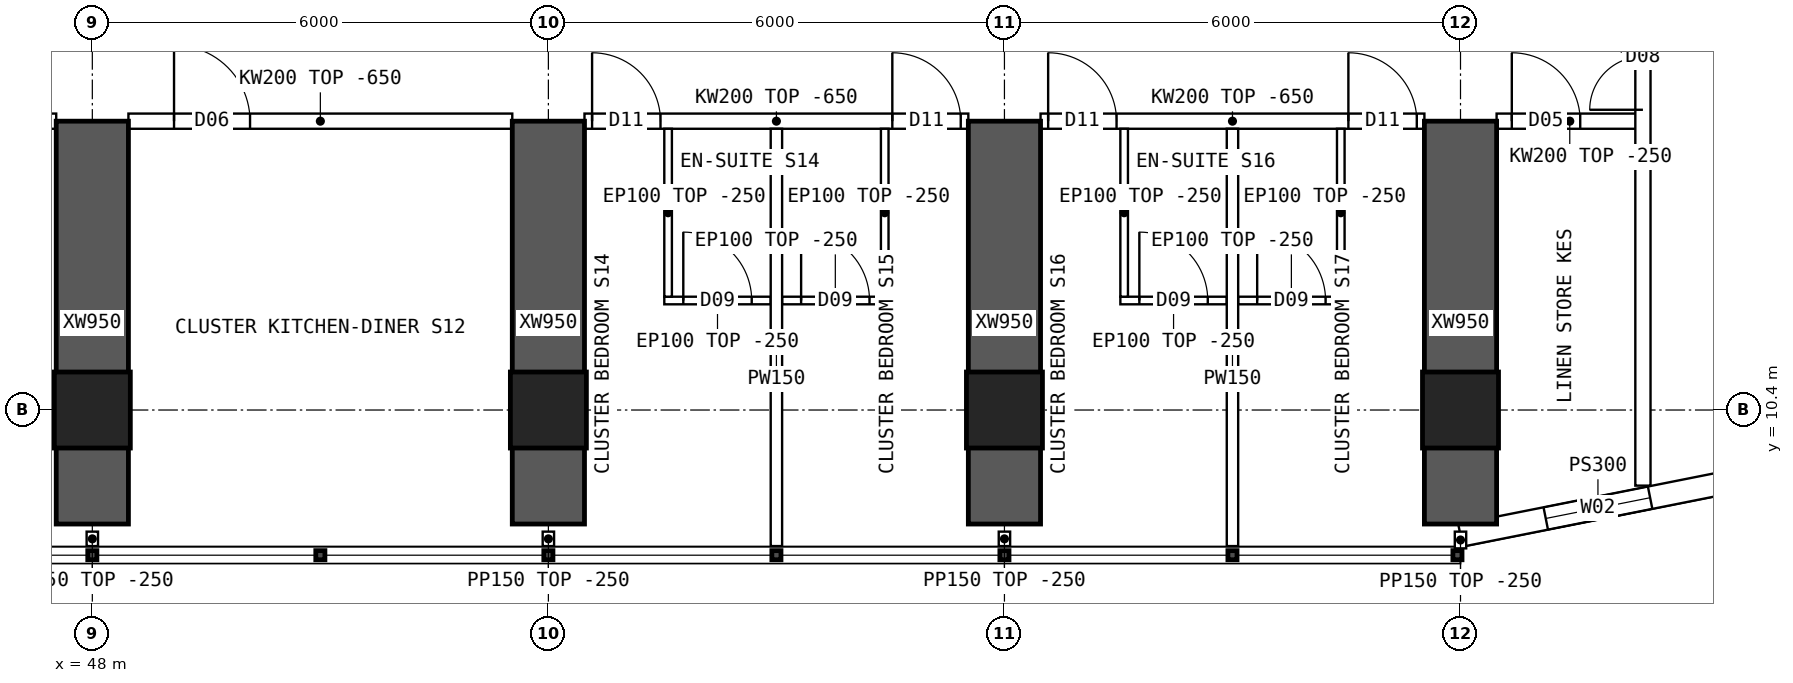
"""IFC4 building model, lengths in metres.
Left out: names, types, materials, properties, quantities, classifications, styles, units other than length and angle.
Written with IfcOpenShell. Run it as: python <this file> out.ifc"""

import sys

from ifc_helpers import new_model, si_unit, direction, frame, frame_2d, origin, origin_2d, place, context, subcontext, project, spatial, polyline, rectangle, hollow_rectangle, outline, extrude, element, fill, save


model = new_model("IFC4")
c1 = context("Model", 3, precision=1e-05, world=origin(), true_north=direction((0.0, 1.0)))
c2 = subcontext(c1, "Body", "Model", "MODEL_VIEW")
j1 = project(units=[si_unit("LENGTHUNIT", "METRE"), si_unit("PLANEANGLEUNIT", "RADIAN")], contexts=[c1])
p1 = place(None, origin())
s1 = spatial("IfcSite", under=j1, at=p1, CompositionType="ELEMENT")
p2 = place(p1, origin())
s2 = spatial("IfcBuilding", under=s1, at=p2, CompositionType="ELEMENT")
p3 = place(p2, frame((0.0, 0.0, 91.9)))
s3 = spatial("IfcBuildingStorey", under=s2, at=p3, CompositionType="ELEMENT", Elevation=91.9)
for number, where, z_axis, x_axis in (
    (1, (48.0, 10.4, 0.0), (0.0, 0.0, 1.0), (1.0, 0.0, 0.0)),
    (2, (54.0, 10.4, 0.0), (0.0, 0.0, 1.0), (1.0, 0.0, 0.0)),
    (3, (60.0, 10.4, 0.0), (0.0, 0.0, 1.0), (1.0, 0.0, 0.0)),
    (4, (66.0, 10.4, 0.0), (0.0, 0.0, 1.0), (1.0, 0.0, 0.0)),
):
    element("IfcColumn", number, at=place(p3, frame(where, z_axis=z_axis, x_axis=x_axis)), inside=s3, PredefinedType="COLUMN", context=c2, shape_type="SweptSolid", body=[
        extrude(hollow_rectangle(XDim=1.0, YDim=1.0, WallThickness=0.1, at=origin_2d()), origin(), (0.0, 0.0, 1.0), 3.75),
    ])
for number, where, z_axis, x_axis in (
    (5, (48.0, 8.9, 0.0), (0.0, 0.0, 1.0), (0.0, 1.0, 0.0)),
    (6, (54.0, 8.9, 0.0), (0.0, 0.0, 1.0), (0.0, 1.0, 0.0)),
    (7, (60.0, 8.9, 0.0), (0.0, 0.0, 1.0), (0.0, 1.0, 0.0)),
    (8, (66.0, 8.9, 0.0), (0.0, 0.0, 1.0), (0.0, 1.0, 0.0)),
):
    element("IfcWall", number, at=place(p3, frame(where, z_axis=z_axis, x_axis=x_axis)), inside=s3, PredefinedType="SHEAR", context=c2, shape_type="SweptSolid", body=[
        extrude(rectangle(XDim=5.3, YDim=0.95, at=frame_2d((2.65, 0.0))), origin(), (0.0, 0.0, 1.0), 3.75),
    ])
p4 = place(p3, frame((66.0, 8.75, 0.0), z_axis=(0.0, 0.0, 1.0), x_axis=(0.980791473772, 0.195059183267, 0.0)))
e9 = element("IfcWall", 9, at=p4, inside=s3, PredefinedType="SOLIDWALL", context=c2, shape_type="SweptSolid", body=[
    extrude(outline(polyline([(-0.03, -0.15), (3.717, -0.15), (3.657, 0.15), (0.03, 0.15), (-0.03, -0.15)])), origin(), (0.0, 0.0, 1.0), 3.5),
])
p5 = place(p4, frame((1.144, 0.0, 0.9)))
e10 = element("IfcOpeningElement", 10, at=p5, cuts=e9, PredefinedType="OPENING", context=c2, shape_type="SweptSolid", body=[
    extrude(rectangle(XDim=1.4, YDim=1.8, at=frame_2d((0.7, 0.9))), frame((0.0, 0.16, 0.0), z_axis=(0.0, -1.0, 0.0), x_axis=(1.0, 0.0, 0.0)), (0.0, 0.0, 1.0), 0.32),
])
p6 = place(p3, frame((42.475, 14.2, 0.0), z_axis=(0.0, 0.0, 1.0), x_axis=(1.0, 0.0, 0.0)))
e11 = element("IfcWall", 11, at=p6, inside=s3, PredefinedType="SOLIDWALL", context=c2, shape_type="SweptSolid", body=[
    extrude(outline(polyline([(0.0, 0.0), (5.05, 0.0), (5.05, 3.1), (0.0, 3.1), (0.0, 0.0)])), frame((0.0, 0.1, 0.0), z_axis=(0.0, -1.0, 0.0), x_axis=(1.0, 0.0, 0.0)), (0.0, 0.0, 1.0), 0.2),
])
p7 = place(p6, frame((0.1, 0.0, 0.0)))
e12 = element("IfcOpeningElement", 12, at=p7, cuts=e11, PredefinedType="OPENING", context=c2, shape_type="SweptSolid", body=[
    extrude(rectangle(XDim=0.9, YDim=2.1, at=frame_2d((0.45, 1.05))), frame((0.0, 0.11, 0.0), z_axis=(0.0, -1.0, 0.0), x_axis=(1.0, 0.0, 0.0)), (0.0, 0.0, 1.0), 0.22),
])
p8 = place(p6, frame((4.05, 0.0, 0.0)))
e13 = element("IfcOpeningElement", 13, at=p8, cuts=e11, PredefinedType="OPENING", context=c2, shape_type="SweptSolid", body=[
    extrude(rectangle(XDim=0.9, YDim=2.1, at=frame_2d((0.45, 1.05))), frame((0.0, 0.11, 0.0), z_axis=(0.0, -1.0, 0.0), x_axis=(1.0, 0.0, 0.0)), (0.0, 0.0, 1.0), 0.22),
])
p9 = place(p3, frame((48.475, 14.2, 0.0), z_axis=(0.0, 0.0, 1.0), x_axis=(1.0, 0.0, 0.0)))
e14 = element("IfcWall", 14, at=p9, inside=s3, PredefinedType="SOLIDWALL", context=c2, shape_type="SweptSolid", body=[
    extrude(outline(polyline([(0.0, 0.0), (5.05, 0.0), (5.05, 3.1), (0.0, 3.1), (0.0, 0.0)])), frame((0.0, 0.1, 0.0), z_axis=(0.0, -1.0, 0.0), x_axis=(1.0, 0.0, 0.0)), (0.0, 0.0, 1.0), 0.2),
])
p10 = place(p9, frame((0.6, 0.0, 0.0)))
e15 = element("IfcOpeningElement", 15, at=p10, cuts=e14, PredefinedType="OPENING", context=c2, shape_type="SweptSolid", body=[
    extrude(rectangle(XDim=1.0, YDim=2.1, at=frame_2d((0.5, 1.05))), frame((0.0, 0.11, 0.0), z_axis=(0.0, -1.0, 0.0), x_axis=(1.0, 0.0, 0.0)), (0.0, 0.0, 1.0), 0.22),
])
p11 = place(p3, frame((54.475, 14.2, 0.0), z_axis=(0.0, 0.0, 1.0), x_axis=(1.0, 0.0, 0.0)))
e16 = element("IfcWall", 16, at=p11, inside=s3, PredefinedType="SOLIDWALL", context=c2, shape_type="SweptSolid", body=[
    extrude(outline(polyline([(0.0, 0.0), (5.05, 0.0), (5.05, 3.1), (0.0, 3.1), (0.0, 0.0)])), frame((0.0, 0.1, 0.0), z_axis=(0.0, -1.0, 0.0), x_axis=(1.0, 0.0, 0.0)), (0.0, 0.0, 1.0), 0.2),
])
p12 = place(p11, frame((0.1, 0.0, 0.0)))
e17 = element("IfcOpeningElement", 17, at=p12, cuts=e16, PredefinedType="OPENING", context=c2, shape_type="SweptSolid", body=[
    extrude(rectangle(XDim=0.9, YDim=2.1, at=frame_2d((0.45, 1.05))), frame((0.0, 0.11, 0.0), z_axis=(0.0, -1.0, 0.0), x_axis=(1.0, 0.0, 0.0)), (0.0, 0.0, 1.0), 0.22),
])
p13 = place(p11, frame((4.05, 0.0, 0.0)))
e18 = element("IfcOpeningElement", 18, at=p13, cuts=e16, PredefinedType="OPENING", context=c2, shape_type="SweptSolid", body=[
    extrude(rectangle(XDim=0.9, YDim=2.1, at=frame_2d((0.45, 1.05))), frame((0.0, 0.11, 0.0), z_axis=(0.0, -1.0, 0.0), x_axis=(1.0, 0.0, 0.0)), (0.0, 0.0, 1.0), 0.22),
])
p14 = place(p3, frame((60.475, 14.2, 0.0), z_axis=(0.0, 0.0, 1.0), x_axis=(1.0, 0.0, 0.0)))
e19 = element("IfcWall", 19, at=p14, inside=s3, PredefinedType="SOLIDWALL", context=c2, shape_type="SweptSolid", body=[
    extrude(outline(polyline([(0.0, 0.0), (5.05, 0.0), (5.05, 3.1), (0.0, 3.1), (0.0, 0.0)])), frame((0.0, 0.1, 0.0), z_axis=(0.0, -1.0, 0.0), x_axis=(1.0, 0.0, 0.0)), (0.0, 0.0, 1.0), 0.2),
])
p15 = place(p14, frame((0.1, 0.0, 0.0)))
e20 = element("IfcOpeningElement", 20, at=p15, cuts=e19, PredefinedType="OPENING", context=c2, shape_type="SweptSolid", body=[
    extrude(rectangle(XDim=0.9, YDim=2.1, at=frame_2d((0.45, 1.05))), frame((0.0, 0.11, 0.0), z_axis=(0.0, -1.0, 0.0), x_axis=(1.0, 0.0, 0.0)), (0.0, 0.0, 1.0), 0.22),
])
p16 = place(p14, frame((4.05, 0.0, 0.0)))
e21 = element("IfcOpeningElement", 21, at=p16, cuts=e19, PredefinedType="OPENING", context=c2, shape_type="SweptSolid", body=[
    extrude(rectangle(XDim=0.9, YDim=2.1, at=frame_2d((0.45, 1.05))), frame((0.0, 0.11, 0.0), z_axis=(0.0, -1.0, 0.0), x_axis=(1.0, 0.0, 0.0)), (0.0, 0.0, 1.0), 0.22),
])
p17 = place(p3, frame((66.475, 14.2, 0.0), z_axis=(0.0, 0.0, 1.0), x_axis=(1.0, 0.0, 0.0)))
e22 = element("IfcWall", 22, at=p17, inside=s3, PredefinedType="SOLIDWALL", context=c2, shape_type="SweptSolid", body=[
    extrude(rectangle(XDim=1.925, YDim=0.2, at=frame_2d((0.962, 0.0))), origin(), (0.0, 0.0, 1.0), 3.5),
])
p18 = place(p17, frame((0.2, 0.0, 0.0)))
e23 = element("IfcOpeningElement", 23, at=p18, cuts=e22, PredefinedType="OPENING", context=c2, shape_type="SweptSolid", body=[
    extrude(rectangle(XDim=0.9, YDim=2.1, at=frame_2d((0.45, 1.05))), frame((0.0, 0.11, 0.0), z_axis=(0.0, -1.0, 0.0), x_axis=(1.0, 0.0, 0.0)), (0.0, 0.0, 1.0), 0.22),
])
p19 = place(p3, frame((57.0, 8.61, 0.0), z_axis=(0.0, 0.0, 1.0), x_axis=(0.0, 1.0, 0.0)))
e24 = element("IfcWall", 24, at=p19, inside=s3, PredefinedType="PARTITIONING", context=c2, shape_type="SweptSolid", body=[
    extrude(outline(polyline([(0.0, 0.0), (5.49, 0.0), (5.49, 3.1), (5.442, 3.1), (5.44, 3.5), (1.992, 3.5), (1.99, 3.1), (1.592, 3.1), (1.59, 3.5), (0.0, 3.5), (0.0, 0.0)])), frame((0.0, 0.075, 0.0), z_axis=(0.0, -1.0, 0.0), x_axis=(1.0, 0.0, 0.0)), (0.0, 0.0, 1.0), 0.15),
])
p20 = place(p3, frame((56.925, 11.841, 0.0), z_axis=(0.0, 0.0, 1.0), x_axis=(-1.0, 0.0, 0.0)))
e25 = element("IfcWall", 25, at=p20, inside=s3, PredefinedType="PARTITIONING", context=c2, shape_type="SweptSolid", body=[
    extrude(rectangle(XDim=1.4, YDim=0.1, at=frame_2d((0.7, 0.0))), origin(), (0.0, 0.0, 1.0), 3.5),
])
p21 = place(p20, frame((0.25, 0.0, 0.0)))
e26 = element("IfcOpeningElement", 26, at=p21, cuts=e25, PredefinedType="OPENING", context=c2, shape_type="SweptSolid", body=[
    extrude(rectangle(XDim=0.9, YDim=2.1, at=frame_2d((0.45, 1.05))), frame((0.0, 0.06, 0.0), z_axis=(0.0, -1.0, 0.0), x_axis=(1.0, 0.0, 0.0)), (0.0, 0.0, 1.0), 0.12),
])
p22 = place(p3, frame((55.575, 11.891, 0.0), z_axis=(0.0, 0.0, 1.0), x_axis=(0.0, 1.0, 0.0)))
e27 = element("IfcWall", 27, at=p22, inside=s3, PredefinedType="PARTITIONING", context=c2, shape_type="SweptSolid", body=[
    extrude(outline(polyline([(0.0, 0.0), (2.209, 0.0), (2.209, 3.1), (2.161, 3.1), (2.159, 3.5), (0.0, 3.5), (0.0, 0.0)])), frame((0.0, 0.05, 0.0), z_axis=(0.0, -1.0, 0.0), x_axis=(1.0, 0.0, 0.0)), (0.0, 0.0, 1.0), 0.1),
])
p23 = place(p3, frame((58.475, 11.841, 0.0), z_axis=(0.0, 0.0, 1.0), x_axis=(-1.0, 0.0, 0.0)))
e28 = element("IfcWall", 28, at=p23, inside=s3, PredefinedType="PARTITIONING", context=c2, shape_type="SweptSolid", body=[
    extrude(rectangle(XDim=1.4, YDim=0.1, at=frame_2d((0.7, 0.0))), origin(), (0.0, 0.0, 1.0), 3.5),
])
p24 = place(p23, frame((0.25, 0.0, 0.0)))
e29 = element("IfcOpeningElement", 29, at=p24, cuts=e28, PredefinedType="OPENING", context=c2, shape_type="SweptSolid", body=[
    extrude(rectangle(XDim=0.9, YDim=2.1, at=frame_2d((0.45, 1.05))), frame((0.0, 0.06, 0.0), z_axis=(0.0, -1.0, 0.0), x_axis=(1.0, 0.0, 0.0)), (0.0, 0.0, 1.0), 0.12),
])
p25 = place(p3, frame((58.425, 11.891, 0.0), z_axis=(0.0, 0.0, 1.0), x_axis=(0.0, 1.0, 0.0)))
e30 = element("IfcWall", 30, at=p25, inside=s3, PredefinedType="PARTITIONING", context=c2, shape_type="SweptSolid", body=[
    extrude(outline(polyline([(0.0, 0.0), (2.209, 0.0), (2.209, 3.1), (2.161, 3.1), (2.159, 3.5), (0.0, 3.5), (0.0, 0.0)])), frame((0.0, 0.05, 0.0), z_axis=(0.0, -1.0, 0.0), x_axis=(1.0, 0.0, 0.0)), (0.0, 0.0, 1.0), 0.1),
])
p26 = place(p3, frame((63.0, 8.61, 0.0), z_axis=(0.0, 0.0, 1.0), x_axis=(0.0, 1.0, 0.0)))
e31 = element("IfcWall", 31, at=p26, inside=s3, PredefinedType="PARTITIONING", context=c2, shape_type="SweptSolid", body=[
    extrude(outline(polyline([(0.0, 0.0), (5.49, 0.0), (5.49, 3.1), (5.442, 3.1), (5.44, 3.5), (1.992, 3.5), (1.99, 3.1), (1.592, 3.1), (1.59, 3.5), (0.0, 3.5), (0.0, 0.0)])), frame((0.0, 0.075, 0.0), z_axis=(0.0, -1.0, 0.0), x_axis=(1.0, 0.0, 0.0)), (0.0, 0.0, 1.0), 0.15),
])
p27 = place(p3, frame((62.925, 11.841, 0.0), z_axis=(0.0, 0.0, 1.0), x_axis=(-1.0, 0.0, 0.0)))
e32 = element("IfcWall", 32, at=p27, inside=s3, PredefinedType="PARTITIONING", context=c2, shape_type="SweptSolid", body=[
    extrude(rectangle(XDim=1.4, YDim=0.1, at=frame_2d((0.7, 0.0))), origin(), (0.0, 0.0, 1.0), 3.5),
])
p28 = place(p27, frame((0.25, 0.0, 0.0)))
e33 = element("IfcOpeningElement", 33, at=p28, cuts=e32, PredefinedType="OPENING", context=c2, shape_type="SweptSolid", body=[
    extrude(rectangle(XDim=0.9, YDim=2.1, at=frame_2d((0.45, 1.05))), frame((0.0, 0.06, 0.0), z_axis=(0.0, -1.0, 0.0), x_axis=(1.0, 0.0, 0.0)), (0.0, 0.0, 1.0), 0.12),
])
p29 = place(p3, frame((61.575, 11.891, 0.0), z_axis=(0.0, 0.0, 1.0), x_axis=(0.0, 1.0, 0.0)))
e34 = element("IfcWall", 34, at=p29, inside=s3, PredefinedType="PARTITIONING", context=c2, shape_type="SweptSolid", body=[
    extrude(outline(polyline([(0.0, 0.0), (2.209, 0.0), (2.209, 3.1), (2.161, 3.1), (2.159, 3.5), (0.0, 3.5), (0.0, 0.0)])), frame((0.0, 0.05, 0.0), z_axis=(0.0, -1.0, 0.0), x_axis=(1.0, 0.0, 0.0)), (0.0, 0.0, 1.0), 0.1),
])
p30 = place(p3, frame((64.475, 11.841, 0.0), z_axis=(0.0, 0.0, 1.0), x_axis=(-1.0, 0.0, 0.0)))
e35 = element("IfcWall", 35, at=p30, inside=s3, PredefinedType="PARTITIONING", context=c2, shape_type="SweptSolid", body=[
    extrude(rectangle(XDim=1.4, YDim=0.1, at=frame_2d((0.7, 0.0))), origin(), (0.0, 0.0, 1.0), 3.5),
])
p31 = place(p30, frame((0.25, 0.0, 0.0)))
e36 = element("IfcOpeningElement", 36, at=p31, cuts=e35, PredefinedType="OPENING", context=c2, shape_type="SweptSolid", body=[
    extrude(rectangle(XDim=0.9, YDim=2.1, at=frame_2d((0.45, 1.05))), frame((0.0, 0.06, 0.0), z_axis=(0.0, -1.0, 0.0), x_axis=(1.0, 0.0, 0.0)), (0.0, 0.0, 1.0), 0.12),
])
p32 = place(p3, frame((64.425, 11.891, 0.0), z_axis=(0.0, 0.0, 1.0), x_axis=(0.0, 1.0, 0.0)))
e37 = element("IfcWall", 37, at=p32, inside=s3, PredefinedType="PARTITIONING", context=c2, shape_type="SweptSolid", body=[
    extrude(outline(polyline([(0.0, 0.0), (2.209, 0.0), (2.209, 3.1), (2.161, 3.1), (2.159, 3.5), (0.0, 3.5), (0.0, 0.0)])), frame((0.0, 0.05, 0.0), z_axis=(0.0, -1.0, 0.0), x_axis=(1.0, 0.0, 0.0)), (0.0, 0.0, 1.0), 0.1),
])
p33 = place(p3, frame((68.4, 9.405, 0.0), z_axis=(0.0, 0.0, 1.0), x_axis=(0.0, 1.0, 0.0)))
e38 = element("IfcWall", 38, at=p33, inside=s3, PredefinedType="SOLIDWALL", context=c2, shape_type="SweptSolid", body=[
    extrude(rectangle(XDim=45.189, YDim=0.2, at=frame_2d((22.595, 0.0))), origin(), (0.0, 0.0, 1.0), 3.5),
])
p34 = place(p33, frame((18.395, 0.0, 0.0)))
e39 = element("IfcOpeningElement", 39, at=p34, cuts=e38, PredefinedType="OPENING", context=c2, shape_type="SweptSolid", body=[
    extrude(rectangle(XDim=1.2, YDim=2.1, at=frame_2d((0.6, 1.05))), frame((0.0, 0.11, 0.0), z_axis=(0.0, -1.0, 0.0), x_axis=(1.0, 0.0, 0.0)), (0.0, 0.0, 1.0), 0.22),
])
p35 = place(p33, frame((30.195, 0.0, 0.0)))
e40 = element("IfcOpeningElement", 40, at=p35, cuts=e38, PredefinedType="OPENING", context=c2, shape_type="SweptSolid", body=[
    extrude(rectangle(XDim=1.2, YDim=2.1, at=frame_2d((0.6, 1.05))), frame((0.0, 0.11, 0.0), z_axis=(0.0, -1.0, 0.0), x_axis=(1.0, 0.0, 0.0)), (0.0, 0.0, 1.0), 0.22),
])
p36 = place(p33, frame((4.945, 0.0, 0.0)))
e41 = element("IfcOpeningElement", 41, at=p36, cuts=e38, PredefinedType="OPENING", context=c2, shape_type="SweptSolid", body=[
    extrude(rectangle(XDim=1.4, YDim=2.1, at=frame_2d((0.7, 1.05))), frame((0.0, 0.11, 0.0), z_axis=(0.0, -1.0, 0.0), x_axis=(1.0, 0.0, 0.0)), (0.0, 0.0, 1.0), 0.22),
])
p37 = place(p33, frame((38.745, 0.0, 0.0)))
e42 = element("IfcOpeningElement", 42, at=p37, cuts=e38, PredefinedType="OPENING", context=c2, shape_type="SweptSolid", body=[
    extrude(rectangle(XDim=1.4, YDim=2.1, at=frame_2d((0.7, 1.05))), frame((0.0, 0.11, 0.0), z_axis=(0.0, -1.0, 0.0), x_axis=(1.0, 0.0, 0.0)), (0.0, 0.0, 1.0), 0.22),
])
for number, where, z_axis, x_axis in (
    (43, (48.0, 8.8, 0.0), (0.0, 0.0, 1.0), (0.0, -1.0, 0.0)),
    (44, (54.0, 8.8, 0.0), (0.0, 0.0, 1.0), (0.0, -1.0, 0.0)),
    (45, (60.0, 8.8, 0.0), (0.0, 0.0, 1.0), (0.0, -1.0, 0.0)),
):
    element("IfcWall", number, at=place(p3, frame(where, z_axis=z_axis, x_axis=x_axis)), inside=s3, PredefinedType="PARTITIONING", context=c2, shape_type="SweptSolid", body=[
        extrude(rectangle(XDim=0.19, YDim=0.15, at=frame_2d((0.095, 0.0))), origin(), (0.0, 0.0, 1.0), 3.5),
    ])
p38 = place(p3, frame((66.0, 8.8, 0.0), z_axis=(0.0, 0.0, 1.0), x_axis=(0.0, -1.0, 0.0)))
e46 = element("IfcWall", 46, at=p38, inside=s3, PredefinedType="PARTITIONING", context=c2, shape_type="SweptSolid", body=[
    extrude(rectangle(XDim=0.22, YDim=0.15, at=frame_2d((0.11, 0.0))), origin(), (0.0, 0.0, 1.0), 3.5),
])
p39 = place(p5, origin())
e47 = element("IfcWindow", 47, at=p39, inside=s3, PartitioningType="SINGLE_PANEL", PredefinedType="WINDOW", context=c2, shape_type="SweptSolid", body=[
    extrude(rectangle(XDim=1.4, YDim=1.8, at=frame_2d((0.7, 0.9))), frame((0.0, 0.03, 0.0), z_axis=(0.0, -1.0, 0.0), x_axis=(1.0, 0.0, 0.0)), (0.0, 0.0, 1.0), 0.06),
])
fill(e10, e47)
p40 = place(p10, origin())
e48 = element("IfcDoor", 48, at=p40, inside=s3, OperationType="SINGLE_SWING_LEFT", PredefinedType="DOOR", context=c2, shape_type="SweptSolid", body=[
    extrude(rectangle(XDim=1.0, YDim=2.1, at=frame_2d((0.5, 1.05))), frame((0.0, 0.025, 0.0), z_axis=(0.0, -1.0, 0.0), x_axis=(1.0, 0.0, 0.0)), (0.0, 0.0, 1.0), 0.05),
])
fill(e15, e48)
p41 = place(p21, origin())
e49 = element("IfcDoor", 49, at=p41, inside=s3, OperationType="SINGLE_SWING_RIGHT", PredefinedType="DOOR", context=c2, shape_type="SweptSolid", body=[
    extrude(rectangle(XDim=0.9, YDim=2.1, at=frame_2d((0.45, 1.05))), frame((0.0, 0.025, 0.0), z_axis=(0.0, -1.0, 0.0), x_axis=(1.0, 0.0, 0.0)), (0.0, 0.0, 1.0), 0.05),
])
fill(e26, e49)
p42 = place(p12, origin())
e50 = element("IfcDoor", 50, at=p42, inside=s3, OperationType="SINGLE_SWING_LEFT", PredefinedType="DOOR", context=c2, shape_type="SweptSolid", body=[
    extrude(rectangle(XDim=0.9, YDim=2.1, at=frame_2d((0.45, 1.05))), frame((0.0, 0.025, 0.0), z_axis=(0.0, -1.0, 0.0), x_axis=(1.0, 0.0, 0.0)), (0.0, 0.0, 1.0), 0.05),
])
fill(e17, e50)
p43 = place(p24, origin())
e51 = element("IfcDoor", 51, at=p43, inside=s3, OperationType="SINGLE_SWING_RIGHT", PredefinedType="DOOR", context=c2, shape_type="SweptSolid", body=[
    extrude(rectangle(XDim=0.9, YDim=2.1, at=frame_2d((0.45, 1.05))), frame((0.0, 0.025, 0.0), z_axis=(0.0, -1.0, 0.0), x_axis=(1.0, 0.0, 0.0)), (0.0, 0.0, 1.0), 0.05),
])
fill(e29, e51)
p44 = place(p13, origin())
e52 = element("IfcDoor", 52, at=p44, inside=s3, OperationType="SINGLE_SWING_LEFT", PredefinedType="DOOR", context=c2, shape_type="SweptSolid", body=[
    extrude(rectangle(XDim=0.9, YDim=2.1, at=frame_2d((0.45, 1.05))), frame((0.0, 0.025, 0.0), z_axis=(0.0, -1.0, 0.0), x_axis=(1.0, 0.0, 0.0)), (0.0, 0.0, 1.0), 0.05),
])
fill(e18, e52)
p45 = place(p28, origin())
e53 = element("IfcDoor", 53, at=p45, inside=s3, OperationType="SINGLE_SWING_RIGHT", PredefinedType="DOOR", context=c2, shape_type="SweptSolid", body=[
    extrude(rectangle(XDim=0.9, YDim=2.1, at=frame_2d((0.45, 1.05))), frame((0.0, 0.025, 0.0), z_axis=(0.0, -1.0, 0.0), x_axis=(1.0, 0.0, 0.0)), (0.0, 0.0, 1.0), 0.05),
])
fill(e33, e53)
p46 = place(p15, origin())
e54 = element("IfcDoor", 54, at=p46, inside=s3, OperationType="SINGLE_SWING_LEFT", PredefinedType="DOOR", context=c2, shape_type="SweptSolid", body=[
    extrude(rectangle(XDim=0.9, YDim=2.1, at=frame_2d((0.45, 1.05))), frame((0.0, 0.025, 0.0), z_axis=(0.0, -1.0, 0.0), x_axis=(1.0, 0.0, 0.0)), (0.0, 0.0, 1.0), 0.05),
])
fill(e20, e54)
p47 = place(p31, origin())
e55 = element("IfcDoor", 55, at=p47, inside=s3, OperationType="SINGLE_SWING_RIGHT", PredefinedType="DOOR", context=c2, shape_type="SweptSolid", body=[
    extrude(rectangle(XDim=0.9, YDim=2.1, at=frame_2d((0.45, 1.05))), frame((0.0, 0.025, 0.0), z_axis=(0.0, -1.0, 0.0), x_axis=(1.0, 0.0, 0.0)), (0.0, 0.0, 1.0), 0.05),
])
fill(e36, e55)
p48 = place(p16, origin())
e56 = element("IfcDoor", 56, at=p48, inside=s3, OperationType="SINGLE_SWING_LEFT", PredefinedType="DOOR", context=c2, shape_type="SweptSolid", body=[
    extrude(rectangle(XDim=0.9, YDim=2.1, at=frame_2d((0.45, 1.05))), frame((0.0, 0.025, 0.0), z_axis=(0.0, -1.0, 0.0), x_axis=(1.0, 0.0, 0.0)), (0.0, 0.0, 1.0), 0.05),
])
fill(e21, e56)
p49 = place(p36, origin())
e57 = element("IfcDoor", 57, at=p49, inside=s3, OperationType="DOUBLE_DOOR_SINGLE_SWING", PredefinedType="DOOR", context=c2, shape_type="SweptSolid", body=[
    extrude(rectangle(XDim=1.4, YDim=2.1, at=frame_2d((0.7, 1.05))), frame((0.0, 0.025, 0.0), z_axis=(0.0, -1.0, 0.0), x_axis=(1.0, 0.0, 0.0)), (0.0, 0.0, 1.0), 0.05),
])
fill(e41, e57)
p50 = place(p18, origin())
e58 = element("IfcDoor", 58, at=p50, inside=s3, OperationType="SINGLE_SWING_LEFT", PredefinedType="DOOR", context=c2, shape_type="SweptSolid", body=[
    extrude(rectangle(XDim=0.9, YDim=2.1, at=frame_2d((0.45, 1.05))), frame((0.0, 0.025, 0.0), z_axis=(0.0, -1.0, 0.0), x_axis=(1.0, 0.0, 0.0)), (0.0, 0.0, 1.0), 0.05),
])
fill(e23, e58)
save(model, sys.argv[1])
